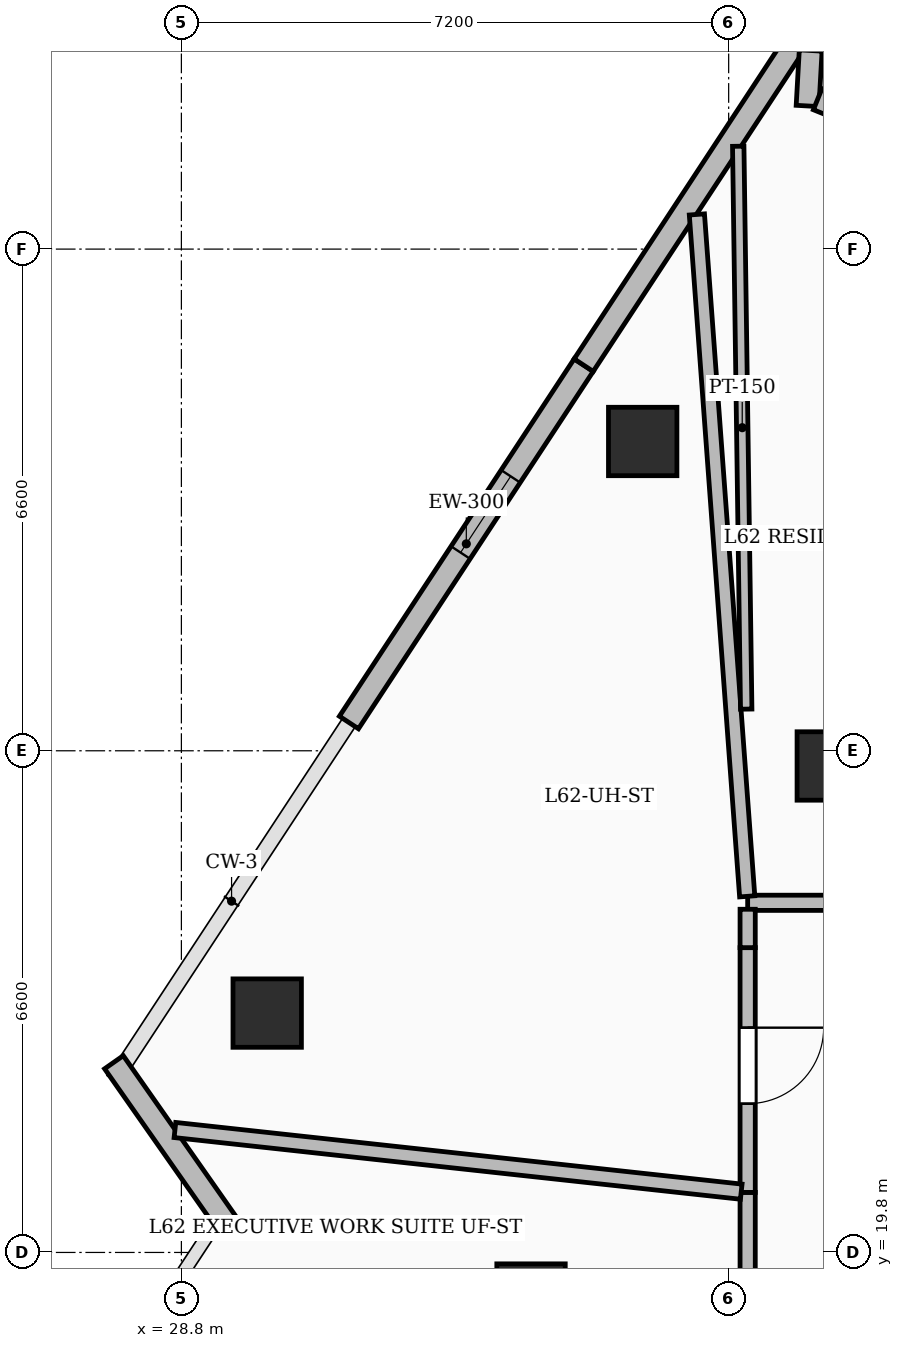
"""IFC4 building model, lengths in metres.
Left out: names, types, materials, properties, quantities, classifications, styles, units other than length and angle.
Written with IfcOpenShell. Run it as: python <this file> out.ifc"""

import sys

from ifc_helpers import new_model, si_unit, direction, frame, frame_2d, origin, origin_2d, place, context, subcontext, project, spatial, rectangle, extrude, element, fill, save


model = new_model("IFC4")
c1 = context("Model", 3, precision=1e-05, world=origin(), true_north=direction((0.0, 1.0)))
c2 = subcontext(c1, "Body", "Model", "MODEL_VIEW")
j1 = project(units=[si_unit("LENGTHUNIT", "METRE"), si_unit("PLANEANGLEUNIT", "RADIAN")], contexts=[c1])
p1 = place(None, origin())
s1 = spatial("IfcSite", under=j1, at=p1, CompositionType="ELEMENT")
p2 = place(p1, origin())
s2 = spatial("IfcBuilding", under=s1, at=p2, CompositionType="ELEMENT")
p3 = place(p2, frame((0.0, 0.0, 240.75)))
s3 = spatial("IfcBuildingStorey", under=s2, at=p3, CompositionType="ELEMENT", Elevation=240.75)
for number, where, z_axis, x_axis in (
    (1, (37.35, 26.2, 0.0), (0.0, 0.0, 1.0), (1.0, 0.0, 0.0)),
    (2, (33.4, 19.2, 0.0), (0.0, 0.0, 1.0), (1.0, 0.0, 0.0)),
    (3, (34.869, 30.469, 0.0), (0.0, 0.0, 1.0), (1.0, 0.0, 0.0)),
    (4, (29.929, 22.949, 0.0), (0.0, 0.0, 1.0), (1.0, 0.0, 0.0)),
):
    element("IfcColumn", number, at=place(p3, frame(where, z_axis=z_axis, x_axis=x_axis)), inside=s3, PredefinedType="COLUMN", context=c2, shape_type="SweptSolid", body=[
        extrude(rectangle(XDim=0.9, YDim=0.9, at=origin_2d()), origin(), (0.0, 0.0, 1.0), 3.75),
    ])
p4 = place(p3, frame((29.401, 20.178, 0.0), z_axis=(0.0, 0.0, 1.0), x_axis=(-0.573967598523, 0.818878010356, 0.0)))
e5 = element("IfcWall", 5, at=p4, inside=s3, PredefinedType="SOLIDWALL", context=c2, shape_type="SweptSolid", body=[
    extrude(rectangle(XDim=2.594, YDim=0.3, at=frame_2d((1.297, 0.0))), origin(), (0.0, 0.0, 1.0), 2.825),
])
p5 = place(p3, frame((31.004, 26.772, 0.0), z_axis=(0.0, 0.0, 1.0), x_axis=(0.549047957694, 0.835790847134, 0.0)))
e6 = element("IfcWall", 6, at=p5, inside=s3, PredefinedType="SOLIDWALL", context=c2, shape_type="SweptSolid", body=[
    extrude(rectangle(XDim=5.625, YDim=0.3, at=frame_2d((2.812, 0.0))), origin(), (0.0, 0.0, 1.0), 3.5),
])
p6 = place(p5, frame((2.675, 0.0, 0.8)))
e7 = element("IfcOpeningElement", 7, at=p6, cuts=e6, PredefinedType="OPENING", context=c2, shape_type="SweptSolid", body=[
    extrude(rectangle(XDim=1.2, YDim=1.8, at=frame_2d((0.6, 0.9))), frame((0.0, 0.16, 0.0), z_axis=(0.0, -1.0, 0.0), x_axis=(1.0, 0.0, 0.0)), (0.0, 0.0, 1.0), 0.32),
])
p7 = place(p3, frame((34.093, 31.473, 0.0), z_axis=(0.0, 0.0, 1.0), x_axis=(0.549058359685, 0.835784013762, 0.0)))
e8 = element("IfcWall", 8, at=p7, inside=s3, PredefinedType="SOLIDWALL", context=c2, shape_type="SweptSolid", body=[
    extrude(rectangle(XDim=5.625, YDim=0.3, at=frame_2d((2.812, 0.0))), origin(), (0.0, 0.0, 1.0), 3.5),
])
p8 = place(p3, frame((37.079, 35.613, 0.0), z_axis=(0.0, 0.0, 1.0), x_axis=(-0.056136239568, -0.998423118025, 0.0)))
e9 = element("IfcWall", 9, at=p8, inside=s3, PredefinedType="SOLIDWALL", context=c2, shape_type="SweptSolid", body=[
    extrude(rectangle(XDim=0.731, YDim=0.3, at=frame_2d((0.365, 0.0))), origin(), (0.0, 0.0, 1.0), 3.5),
])
p9 = place(p3, frame((37.171, 34.972, 0.0), z_axis=(0.0, 0.0, 1.0), x_axis=(0.927076098221, -0.37487318937, 0.0)))
e10 = element("IfcWall", 10, at=p9, inside=s3, PredefinedType="SOLIDWALL", context=c2, shape_type="SweptSolid", body=[
    extrude(rectangle(XDim=2.126, YDim=0.3, at=frame_2d((1.063, 0.0))), origin(), (0.0, 0.0, 1.0), 3.5),
])
p10 = place(p9, frame((0.275, 0.0, 0.8)))
e11 = element("IfcOpeningElement", 11, at=p10, cuts=e10, PredefinedType="OPENING", context=c2, shape_type="SweptSolid", body=[
    extrude(rectangle(XDim=1.2, YDim=1.8, at=frame_2d((0.6, 0.9))), frame((0.0, 0.16, 0.0), z_axis=(0.0, -1.0, 0.0), x_axis=(1.0, 0.0, 0.0)), (0.0, 0.0, 1.0), 0.32),
])
p11 = place(p3, frame((36.25, 20.59, 0.0), z_axis=(0.0, 0.0, 1.0), x_axis=(0.0, -1.0, 0.0)))
e12 = element("IfcWall", 12, at=p11, inside=s3, PredefinedType="PARTITIONING", context=c2, shape_type="SweptSolid", body=[
    extrude(rectangle(XDim=1.39, YDim=0.2, at=frame_2d((0.695, 0.0))), origin(), (0.0, 0.0, 1.0), 3.5),
])
p12 = place(p3, frame((36.25, 23.81, 0.0), z_axis=(0.0, 0.0, 1.0), x_axis=(0.0, -1.0, 0.0)))
e13 = element("IfcWall", 13, at=p12, inside=s3, PredefinedType="PARTITIONING", context=c2, shape_type="SweptSolid", body=[
    extrude(rectangle(XDim=3.22, YDim=0.2, at=frame_2d((1.61, 0.0))), origin(), (0.0, 0.0, 1.0), 2.685),
])
p13 = place(p12, frame((1.053, 0.0, 0.0)))
e14 = element("IfcOpeningElement", 14, at=p13, cuts=e13, PredefinedType="OPENING", context=c2, shape_type="SweptSolid", body=[
    extrude(rectangle(XDim=1.0, YDim=2.2, at=frame_2d((0.5, 1.1))), frame((0.0, 0.11, 0.0), z_axis=(0.0, -1.0, 0.0), x_axis=(1.0, 0.0, 0.0)), (0.0, 0.0, 1.0), 0.22),
])
p14 = place(p3, frame((38.115, 24.4, 0.0), z_axis=(0.0, 0.0, 1.0), x_axis=(-1.0, 0.0, 0.0)))
e15 = element("IfcWall", 15, at=p14, inside=s3, PredefinedType="PARTITIONING", context=c2, shape_type="SweptSolid", body=[
    extrude(rectangle(XDim=1.865, YDim=0.2, at=frame_2d((0.933, 0.0))), origin(), (0.0, 0.0, 1.0), 2.685),
])
p15 = place(p3, frame((36.244, 24.485, 0.0), z_axis=(0.0, 0.0, 1.0), x_axis=(-0.073576769904, 0.997289556212, 0.0)))
e16 = element("IfcWall", 16, at=p15, inside=s3, PredefinedType="PARTITIONING", context=c2, shape_type="SweptSolid", body=[
    extrude(rectangle(XDim=8.996, YDim=0.2, at=frame_2d((4.498, 0.0))), origin(), (0.0, 0.0, 1.0), 2.685),
])
p16 = place(p3, frame((36.25, 24.315, 0.0), z_axis=(0.0, 0.0, 1.0), x_axis=(0.0, -1.0, 0.0)))
e17 = element("IfcWall", 17, at=p16, inside=s3, PredefinedType="PARTITIONING", context=c2, shape_type="SweptSolid", body=[
    extrude(rectangle(XDim=0.505, YDim=0.2, at=frame_2d((0.252, 0.0))), origin(), (0.0, 0.0, 1.0), 2.685),
])
p17 = place(p3, frame((36.166, 20.6, 0.0), z_axis=(0.0, 0.0, 1.0), x_axis=(-0.994123675756, 0.108250253122, 0.0)))
e18 = element("IfcWall", 18, at=p17, inside=s3, PredefinedType="PARTITIONING", context=c2, shape_type="SweptSolid", body=[
    extrude(rectangle(XDim=7.494, YDim=0.2, at=frame_2d((3.747, 0.0))), origin(), (0.0, 0.0, 1.0), 2.685),
])
p18 = place(p3, frame((36.231, 26.948, 0.0), z_axis=(0.0, 0.0, 1.0), x_axis=(-0.014175490249, 0.99989952269, 0.0)))
e19 = element("IfcWall", 19, at=p18, inside=s3, PredefinedType="PARTITIONING", context=c2, shape_type="SweptSolid", body=[
    extrude(rectangle(XDim=7.406, YDim=0.15, at=frame_2d((3.703, 0.0))), origin(), (0.0, 0.0, 1.0), 2.685),
])
p19 = place(p6, origin())
e20 = element("IfcWindow", 20, at=p19, inside=s3, PartitioningType="SINGLE_PANEL", PredefinedType="WINDOW", context=c2, shape_type="SweptSolid", body=[
    extrude(rectangle(XDim=1.2, YDim=1.8, at=frame_2d((0.6, 0.9))), frame((0.0, 0.03, 0.0), z_axis=(0.0, -1.0, 0.0), x_axis=(1.0, 0.0, 0.0)), (0.0, 0.0, 1.0), 0.06),
])
fill(e7, e20)
p20 = place(p13, origin())
e21 = element("IfcDoor", 21, at=p20, inside=s3, OperationType="SINGLE_SWING_LEFT", PredefinedType="DOOR", context=c2, shape_type="SweptSolid", body=[
    extrude(rectangle(XDim=1.0, YDim=2.2, at=frame_2d((0.5, 1.1))), frame((0.0, 0.025, 0.0), z_axis=(0.0, -1.0, 0.0), x_axis=(1.0, 0.0, 0.0)), (0.0, 0.0, 1.0), 0.05),
])
fill(e14, e21)
save(model, sys.argv[1])
